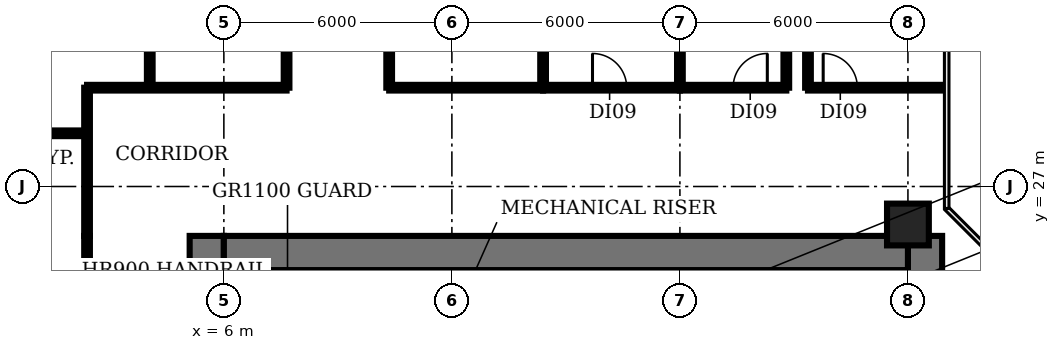
"""IFC4 building model, lengths in metres.
Left out: names, types, materials, properties, quantities, classifications, styles, units other than length and angle.
Written with IfcOpenShell. Run it as: python <this file> out.ifc"""

import sys

from ifc_helpers import new_model, si_unit, direction, frame, frame_2d, origin, origin_2d, place, context, subcontext, project, spatial, rectangle, circle, extrude, element, fill, save


model = new_model("IFC4")
c1 = context("Model", 3, precision=1e-05, world=origin(), true_north=direction((0.0, 1.0)))
c2 = subcontext(c1, "Body", "Model", "MODEL_VIEW")
j1 = project(units=[si_unit("LENGTHUNIT", "METRE"), si_unit("PLANEANGLEUNIT", "RADIAN")], contexts=[c1])
p1 = place(None, origin())
s1 = spatial("IfcSite", under=j1, at=p1, CompositionType="ELEMENT")
p2 = place(p1, origin())
s2 = spatial("IfcBuilding", under=s1, at=p2, CompositionType="ELEMENT")
p3 = place(p2, frame((0.0, 0.0, 20.0)))
s3 = spatial("IfcBuildingStorey", under=s2, at=p3, CompositionType="ELEMENT", Elevation=20.0)
p4 = place(p3, frame((24.0, 26.0, 0.0), z_axis=(0.0, 0.0, 1.0), x_axis=(1.0, 0.0, 0.0)))
e1 = element("IfcColumn", 1, at=p4, inside=s3, PredefinedType="COLUMN", context=c2, shape_type="SweptSolid", body=[
    extrude(circle(Radius=0.55, at=origin_2d()), origin(), (0.0, 0.0, 1.0), 4.15),
])
p5 = place(p3, frame((9.275, 18.375, 0.0), z_axis=(0.0, 0.0, 1.0), x_axis=(0.0, 1.0, 0.0)))
e2 = element("IfcWall", 2, at=p5, inside=s3, PredefinedType="SHEAR", context=c2, shape_type="SweptSolid", body=[
    extrude(rectangle(XDim=6.425, YDim=0.25, at=frame_2d((3.212, 0.0))), origin(), (0.0, 0.0, 1.0), 4.15),
])
for number, where, z_axis, x_axis in (
    (3, (15.1, 22.9, 0.0), (0.0, 0.0, 1.0), (0.0, 1.0, 0.0)),
    (4, (20.7, 22.9, 0.0), (0.0, 0.0, 1.0), (0.0, 1.0, 0.0)),
):
    element("IfcWall", number, at=place(p3, frame(where, z_axis=z_axis, x_axis=x_axis)), inside=s3, PredefinedType="SHEAR", context=c2, shape_type="SweptSolid", body=[
        extrude(rectangle(XDim=1.9, YDim=0.2, at=frame_2d((0.95, 0.0))), origin(), (0.0, 0.0, 1.0), 4.15),
    ])
p6 = place(p3, frame((5.55, 4.5, 0.0), z_axis=(0.0, 0.0, 1.0), x_axis=(0.0, 1.0, 0.0)))
e5 = element("IfcWall", 5, at=p6, inside=s3, PredefinedType="SHEAR", context=c2, shape_type="SweptSolid", body=[
    extrude(rectangle(XDim=21.2, YDim=0.9, at=frame_2d((10.6, 0.0))), origin(), (0.0, 0.0, 1.0), 4.15),
])
p7 = place(p6, frame((7.6, 0.0, 0.0)))
e6 = element("IfcOpeningElement", 6, at=p7, cuts=e5, PredefinedType="OPENING", context=c2, shape_type="SweptSolid", body=[
    extrude(rectangle(XDim=1.2, YDim=2.1, at=frame_2d((0.6, 1.05))), frame((0.0, 0.46, 0.0), z_axis=(0.0, -1.0, 0.0), x_axis=(1.0, 0.0, 0.0)), (0.0, 0.0, 1.0), 0.92),
])
p8 = place(p6, frame((14.15, 0.0, 0.0)))
e7 = element("IfcOpeningElement", 7, at=p8, cuts=e5, PredefinedType="OPENING", context=c2, shape_type="SweptSolid", body=[
    extrude(rectangle(XDim=1.2, YDim=2.1, at=frame_2d((0.6, 1.05))), frame((0.0, 0.46, 0.0), z_axis=(0.0, -1.0, 0.0), x_axis=(1.0, 0.0, 0.0)), (0.0, 0.0, 1.0), 0.92),
])
p9 = place(p3, frame((24.45, 25.7, 0.0), z_axis=(0.0, 0.0, 1.0), x_axis=(0.0, -1.0, 0.0)))
e8 = element("IfcWall", 8, at=p9, inside=s3, PredefinedType="SHEAR", context=c2, shape_type="SweptSolid", body=[
    extrude(rectangle(XDim=21.2, YDim=0.9, at=frame_2d((10.6, 0.0))), origin(), (0.0, 0.0, 1.0), 4.15),
])
p10 = place(p9, frame((12.45, 0.0, 0.0)))
e9 = element("IfcOpeningElement", 9, at=p10, cuts=e8, PredefinedType="OPENING", context=c2, shape_type="SweptSolid", body=[
    extrude(rectangle(XDim=0.9, YDim=2.1, at=frame_2d((0.45, 1.05))), frame((0.0, 0.46, 0.0), z_axis=(0.0, -1.0, 0.0), x_axis=(1.0, 0.0, 0.0)), (0.0, 0.0, 1.0), 0.92),
])
p11 = place(p9, frame((6.45, 0.0, 0.0)))
e10 = element("IfcOpeningElement", 10, at=p11, cuts=e8, PredefinedType="OPENING", context=c2, shape_type="SweptSolid", body=[
    extrude(rectangle(XDim=2.0, YDim=2.1, at=frame_2d((1.0, 1.05))), frame((0.0, 0.46, 0.0), z_axis=(0.0, -1.0, 0.0), x_axis=(1.0, 0.0, 0.0)), (0.0, 0.0, 1.0), 0.92),
])
p12 = place(p3, frame((6.0, 25.25, 0.0), z_axis=(0.0, 0.0, 1.0), x_axis=(1.0, 0.0, 0.0)))
e11 = element("IfcWall", 11, at=p12, inside=s3, PredefinedType="SHEAR", context=c2, shape_type="SweptSolid", body=[
    extrude(rectangle(XDim=18.0, YDim=0.9, at=frame_2d((9.0, 0.0))), origin(), (0.0, 0.0, 1.0), 4.15),
])
p13 = place(p3, frame((-0.97, 28.4, 0.0), z_axis=(0.0, 0.0, 1.0), x_axis=(1.0, 0.0, 0.0)))
e12 = element("IfcWall", 12, at=p13, inside=s3, PredefinedType="PARTITIONING", context=c2, shape_type="SweptSolid", body=[
    extrude(rectangle(XDim=3.37, YDim=0.15, at=frame_2d((1.685, 0.0))), origin(), (0.0, 0.0, 1.0), 3.08),
])
p14 = place(p3, frame((2.4, 4.5, 0.0), z_axis=(0.0, 0.0, 1.0), x_axis=(0.0, 1.0, 0.0)))
e13 = element("IfcWall", 13, at=p14, inside=s3, PredefinedType="PARTITIONING", context=c2, shape_type="SweptSolid", body=[
    extrude(rectangle(XDim=21.2, YDim=0.15, at=frame_2d((10.6, 0.0))), origin(), (0.0, 0.0, 1.0), 3.08),
])
p15 = place(p14, frame((10.8, 0.0, 0.0)))
e14 = element("IfcOpeningElement", 14, at=p15, cuts=e13, PredefinedType="OPENING", context=c2, shape_type="SweptSolid", body=[
    extrude(rectangle(XDim=1.2, YDim=2.1, at=frame_2d((0.6, 1.05))), frame((0.0, 0.085, 0.0), z_axis=(0.0, -1.0, 0.0), x_axis=(1.0, 0.0, 0.0)), (0.0, 0.0, 1.0), 0.17),
])
p16 = place(p3, frame((2.4, 25.7, 0.0), z_axis=(0.0, 0.0, 1.0), x_axis=(0.0, 1.0, 0.0)))
e15 = element("IfcWall", 15, at=p16, inside=s3, PredefinedType="PARTITIONING", context=c2, shape_type="SweptSolid", body=[
    extrude(rectangle(XDim=3.9, YDim=0.15, at=frame_2d((1.95, 0.0))), origin(), (0.0, 0.0, 1.0), 3.08),
])
p17 = place(p3, frame((2.4, 29.6, 0.0), z_axis=(0.0, 0.0, 1.0), x_axis=(1.0, 0.0, 0.0)))
e16 = element("IfcWall", 16, at=p17, inside=s3, PredefinedType="PARTITIONING", context=c2, shape_type="SweptSolid", body=[
    extrude(rectangle(XDim=5.25, YDim=0.15, at=frame_2d((2.625, 0.0))), origin(), (0.0, 0.0, 1.0), 3.08),
])
p18 = place(p3, frame((4.05, 29.6, 0.0), z_axis=(0.0, 0.0, 1.0), x_axis=(0.0, 1.0, 0.0)))
e17 = element("IfcWall", 17, at=p18, inside=s3, PredefinedType="PARTITIONING", context=c2, shape_type="SweptSolid", body=[
    extrude(rectangle(XDim=4.8, YDim=0.15, at=frame_2d((2.4, 0.0))), origin(), (0.0, 0.0, 1.0), 3.08),
])
p19 = place(p3, frame((7.65, 29.6, 0.0), z_axis=(0.0, 0.0, 1.0), x_axis=(0.0, 1.0, 0.0)))
e18 = element("IfcWall", 18, at=p19, inside=s3, PredefinedType="PARTITIONING", context=c2, shape_type="SweptSolid", body=[
    extrude(rectangle(XDim=4.8, YDim=0.15, at=frame_2d((2.4, 0.0))), origin(), (0.0, 0.0, 1.0), 3.08),
])
p20 = place(p19, frame((3.7, 0.0, 0.0)))
e19 = element("IfcOpeningElement", 19, at=p20, cuts=e18, PredefinedType="OPENING", context=c2, shape_type="SweptSolid", body=[
    extrude(rectangle(XDim=0.9, YDim=2.1, at=frame_2d((0.45, 1.05))), frame((0.0, 0.085, 0.0), z_axis=(0.0, -1.0, 0.0), x_axis=(1.0, 0.0, 0.0)), (0.0, 0.0, 1.0), 0.17),
])
p21 = place(p3, frame((10.35, 29.6, 0.0), z_axis=(0.0, 0.0, 1.0), x_axis=(0.0, 1.0, 0.0)))
e20 = element("IfcWall", 20, at=p21, inside=s3, PredefinedType="PARTITIONING", context=c2, shape_type="SweptSolid", body=[
    extrude(rectangle(XDim=4.8, YDim=0.15, at=frame_2d((2.4, 0.0))), origin(), (0.0, 0.0, 1.0), 3.08),
])
p22 = place(p3, frame((10.35, 29.6, 0.0), z_axis=(0.0, 0.0, 1.0), x_axis=(1.0, 0.0, 0.0)))
e21 = element("IfcWall", 21, at=p22, inside=s3, PredefinedType="PARTITIONING", context=c2, shape_type="SweptSolid", body=[
    extrude(rectangle(XDim=4.05, YDim=0.15, at=frame_2d((2.025, 0.0))), origin(), (0.0, 0.0, 1.0), 3.08),
])
p23 = place(p3, frame((14.4, 29.6, 0.0), z_axis=(0.0, 0.0, 1.0), x_axis=(0.0, 1.0, 0.0)))
e22 = element("IfcWall", 22, at=p23, inside=s3, PredefinedType="PARTITIONING", context=c2, shape_type="SweptSolid", body=[
    extrude(rectangle(XDim=4.8, YDim=0.15, at=frame_2d((2.4, 0.0))), origin(), (0.0, 0.0, 1.0), 3.08),
])
p24 = place(p3, frame((14.4, 29.6, 0.0), z_axis=(0.0, 0.0, 1.0), x_axis=(1.0, 0.0, 0.0)))
e23 = element("IfcWall", 23, at=p24, inside=s3, PredefinedType="PARTITIONING", context=c2, shape_type="SweptSolid", body=[
    extrude(rectangle(XDim=3.6, YDim=0.15, at=frame_2d((1.8, 0.0))), origin(), (0.0, 0.0, 1.0), 3.08),
])
p25 = place(p24, frame((1.3, 0.0, 0.0)))
e24 = element("IfcOpeningElement", 24, at=p25, cuts=e23, PredefinedType="OPENING", context=c2, shape_type="SweptSolid", body=[
    extrude(rectangle(XDim=0.9, YDim=2.1, at=frame_2d((0.45, 1.05))), frame((0.0, 0.085, 0.0), z_axis=(0.0, -1.0, 0.0), x_axis=(1.0, 0.0, 0.0)), (0.0, 0.0, 1.0), 0.17),
])
p26 = place(p3, frame((18.0, 29.6, 0.0), z_axis=(0.0, 0.0, 1.0), x_axis=(0.0, 1.0, 0.0)))
e25 = element("IfcWall", 25, at=p26, inside=s3, PredefinedType="PARTITIONING", context=c2, shape_type="SweptSolid", body=[
    extrude(rectangle(XDim=4.8, YDim=0.15, at=frame_2d((2.4, 0.0))), origin(), (0.0, 0.0, 1.0), 3.08),
])
p27 = place(p3, frame((18.0, 29.6, 0.0), z_axis=(0.0, 0.0, 1.0), x_axis=(1.0, 0.0, 0.0)))
e26 = element("IfcWall", 26, at=p27, inside=s3, PredefinedType="PARTITIONING", context=c2, shape_type="SweptSolid", body=[
    extrude(rectangle(XDim=2.8, YDim=0.15, at=frame_2d((1.4, 0.0))), origin(), (0.0, 0.0, 1.0), 3.08),
])
p28 = place(p27, frame((1.4, 0.0, 0.0)))
e27 = element("IfcOpeningElement", 27, at=p28, cuts=e26, PredefinedType="OPENING", context=c2, shape_type="SweptSolid", body=[
    extrude(rectangle(XDim=0.9, YDim=2.1, at=frame_2d((0.45, 1.05))), frame((0.0, 0.085, 0.0), z_axis=(0.0, -1.0, 0.0), x_axis=(1.0, 0.0, 0.0)), (0.0, 0.0, 1.0), 0.17),
])
for number, where, z_axis, x_axis in (
    (28, (20.8, 29.6, 0.0), (0.0, 0.0, 1.0), (0.0, 1.0, 0.0)),
    (29, (21.37, 29.6, 0.0), (0.0, 0.0, 1.0), (0.0, 1.0, 0.0)),
):
    element("IfcWall", number, at=place(p3, frame(where, z_axis=z_axis, x_axis=x_axis)), inside=s3, PredefinedType="PARTITIONING", context=c2, shape_type="SweptSolid", body=[
        extrude(rectangle(XDim=4.8, YDim=0.15, at=frame_2d((2.4, 0.0))), origin(), (0.0, 0.0, 1.0), 3.08),
    ])
p29 = place(p3, frame((21.37, 29.6, 0.0), z_axis=(0.0, 0.0, 1.0), x_axis=(1.0, 0.0, 0.0)))
e30 = element("IfcWall", 30, at=p29, inside=s3, PredefinedType="PARTITIONING", context=c2, shape_type="SweptSolid", body=[
    extrude(rectangle(XDim=3.6, YDim=0.15, at=frame_2d((1.8, 0.0))), origin(), (0.0, 0.0, 1.0), 3.08),
])
p30 = place(p29, frame((0.4, 0.0, 0.0)))
e31 = element("IfcOpeningElement", 31, at=p30, cuts=e30, PredefinedType="OPENING", context=c2, shape_type="SweptSolid", body=[
    extrude(rectangle(XDim=0.9, YDim=2.1, at=frame_2d((0.45, 1.05))), frame((0.0, 0.085, 0.0), z_axis=(0.0, -1.0, 0.0), x_axis=(1.0, 0.0, 0.0)), (0.0, 0.0, 1.0), 0.17),
])
p31 = place(p25, origin())
e32 = element("IfcDoor", 32, at=p31, inside=s3, OperationType="SINGLE_SWING_LEFT", PredefinedType="DOOR", context=c2, shape_type="SweptSolid", body=[
    extrude(rectangle(XDim=0.9, YDim=2.1, at=frame_2d((0.45, 1.05))), frame((0.0, 0.025, 0.0), z_axis=(0.0, -1.0, 0.0), x_axis=(1.0, 0.0, 0.0)), (0.0, 0.0, 1.0), 0.05),
])
fill(e24, e32)
p32 = place(p28, origin())
e33 = element("IfcDoor", 33, at=p32, inside=s3, OperationType="SINGLE_SWING_RIGHT", PredefinedType="DOOR", context=c2, shape_type="SweptSolid", body=[
    extrude(rectangle(XDim=0.9, YDim=2.1, at=frame_2d((0.45, 1.05))), frame((0.0, 0.025, 0.0), z_axis=(0.0, -1.0, 0.0), x_axis=(1.0, 0.0, 0.0)), (0.0, 0.0, 1.0), 0.05),
])
fill(e27, e33)
p33 = place(p30, origin())
e34 = element("IfcDoor", 34, at=p33, inside=s3, OperationType="SINGLE_SWING_LEFT", PredefinedType="DOOR", context=c2, shape_type="SweptSolid", body=[
    extrude(rectangle(XDim=0.9, YDim=2.1, at=frame_2d((0.45, 1.05))), frame((0.0, 0.025, 0.0), z_axis=(0.0, -1.0, 0.0), x_axis=(1.0, 0.0, 0.0)), (0.0, 0.0, 1.0), 0.05),
])
fill(e31, e34)
save(model, sys.argv[1])
